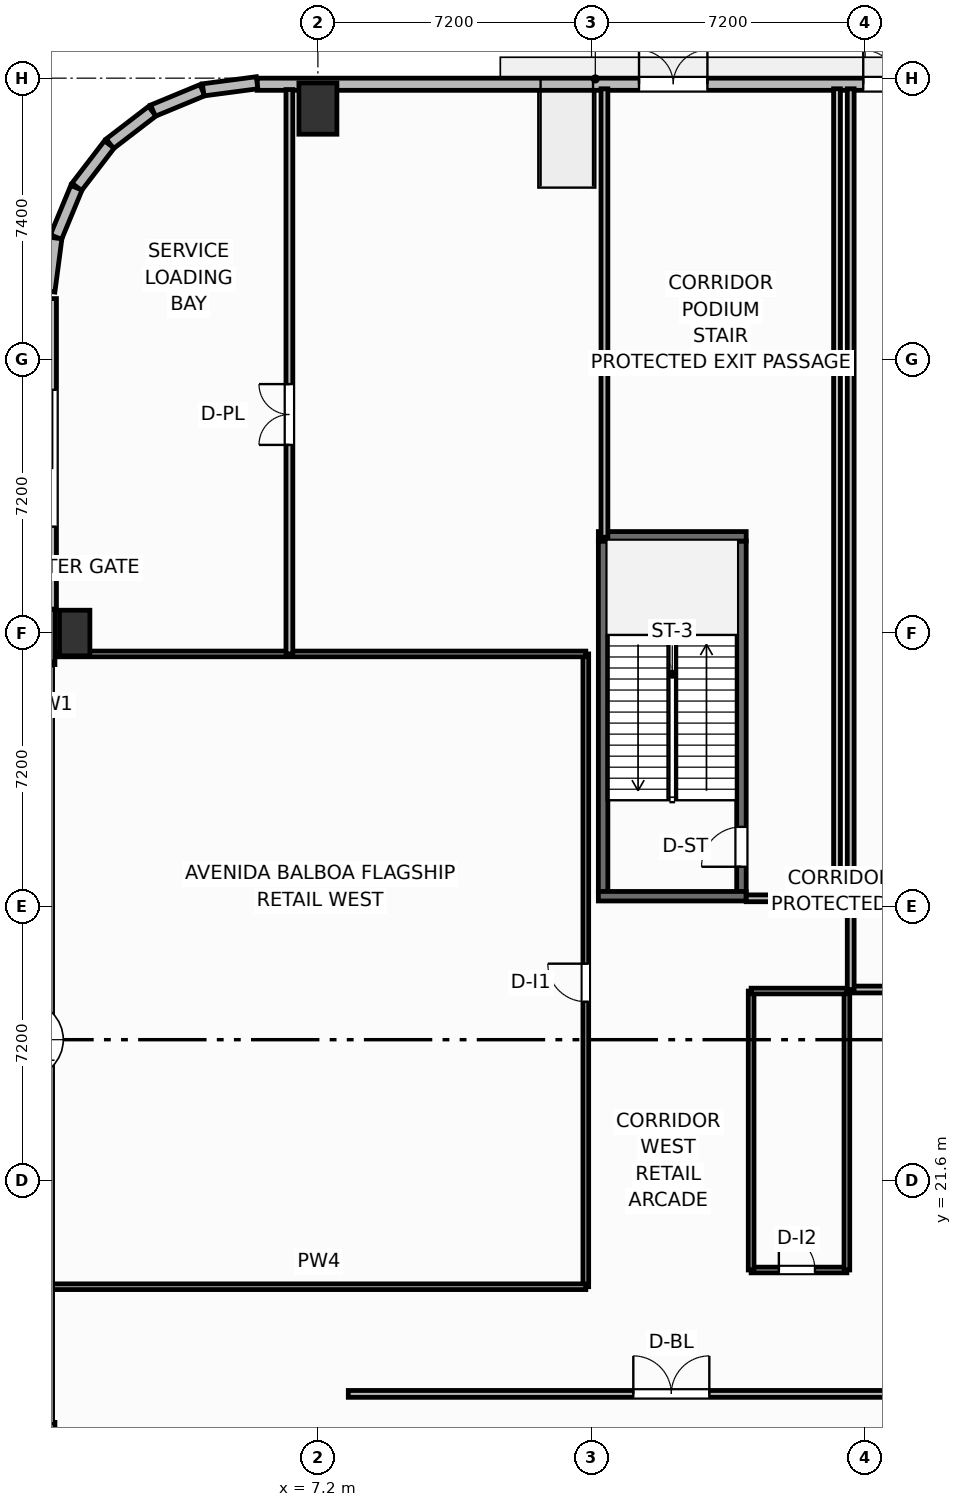
"""IFC4 building model, lengths in metres.
Left out: names, types, materials, properties, quantities, classifications, styles, units other than length and angle.
Written with IfcOpenShell. Run it as: python <this file> out.ifc"""

import sys

from ifc_helpers import new_model, si_unit, direction, frame, frame_2d, origin, origin_2d, place, context, subcontext, project, spatial, rectangle, extrude, element, fill, save


model = new_model("IFC4")
c1 = context("Model", 3, precision=1e-05, world=origin(), true_north=direction((0.0, 1.0)))
c2 = subcontext(c1, "Body", "Model", "MODEL_VIEW")
j1 = project(units=[si_unit("LENGTHUNIT", "METRE"), si_unit("PLANEANGLEUNIT", "RADIAN")], contexts=[c1])
p1 = place(None, origin())
s1 = spatial("IfcSite", under=j1, at=p1, CompositionType="ELEMENT")
p2 = place(p1, origin())
s2 = spatial("IfcBuilding", under=s1, at=p2, CompositionType="ELEMENT")
p3 = place(p2, origin())
s3 = spatial("IfcBuildingStorey", under=s2, at=p3, CompositionType="ELEMENT", Elevation=0.0)
p4 = place(p3, frame((14.705, 29.2, 0.0), z_axis=(0.0, 0.0, 1.0), x_axis=(0.0, 1.0, 0.0)))
e1 = element("IfcWall", 1, at=p4, inside=s3, PredefinedType="SHEAR", context=c2, shape_type="SweptSolid", body=[
    extrude(rectangle(XDim=9.22, YDim=0.25, at=frame_2d((4.61, 0.0))), origin(), (0.0, 0.0, 1.0), 5.12),
])
p5 = place(p3, frame((18.345, 29.2, 0.0), z_axis=(0.0, 0.0, 1.0), x_axis=(0.0, 1.0, 0.0)))
e2 = element("IfcWall", 2, at=p5, inside=s3, PredefinedType="SHEAR", context=c2, shape_type="SweptSolid", body=[
    extrude(rectangle(XDim=9.22, YDim=0.25, at=frame_2d((4.61, 0.0))), origin(), (0.0, 0.0, 1.0), 5.12),
])
p6 = place(p5, frame((0.65, 0.0, 0.0)))
e3 = element("IfcOpeningElement", 3, at=p6, cuts=e2, PredefinedType="OPENING", context=c2, shape_type="SweptSolid", body=[
    extrude(rectangle(XDim=1.05, YDim=2.15, at=frame_2d((0.525, 1.075))), frame((0.0, 0.135, 0.0), z_axis=(0.0, -1.0, 0.0), x_axis=(1.0, 0.0, 0.0)), (0.0, 0.0, 1.0), 0.27),
])
for number, where, z_axis, x_axis in (
    (4, (14.58, 38.545, 0.0), (0.0, 0.0, 1.0), (1.0, 0.0, 0.0)),
    (5, (14.58, 29.075, 0.0), (0.0, 0.0, 1.0), (1.0, 0.0, 0.0)),
):
    element("IfcWall", number, at=place(p3, frame(where, z_axis=z_axis, x_axis=x_axis)), inside=s3, PredefinedType="SHEAR", context=c2, shape_type="SweptSolid", body=[
        extrude(rectangle(XDim=3.89, YDim=0.25, at=frame_2d((1.945, 0.0))), origin(), (0.0, 0.0, 1.0), 5.12),
    ])
p7 = place(p3, frame((7.2, 49.8, 0.0), z_axis=(0.0, 0.0, 1.0), x_axis=(1.0, 0.0, 0.0)))
e6 = element("IfcColumn", 6, at=p7, inside=s3, PredefinedType="COLUMN", context=c2, shape_type="SweptSolid", body=[
    extrude(rectangle(XDim=1.0, YDim=1.35, at=origin_2d()), origin(), (0.0, 0.0, 1.0), 5.4),
])
p8 = place(p3, frame((0.8, 36.0, 0.0), z_axis=(0.0, 0.0, 1.0), x_axis=(1.0, 0.0, 0.0)))
e7 = element("IfcColumn", 7, at=p8, inside=s3, PredefinedType="PILASTER", context=c2, shape_type="SweptSolid", body=[
    extrude(rectangle(XDim=0.8, YDim=1.2, at=origin_2d()), origin(), (0.0, 0.0, 1.0), 5.4),
])
p9 = place(p3, frame((5.6, 50.44, 0.0), z_axis=(0.0, 0.0, 1.0), x_axis=(1.0, 0.0, 0.0)))
e8 = element("IfcWall", 8, at=p9, inside=s3, PredefinedType="SOLIDWALL", context=c2, shape_type="SweptSolid", body=[
    extrude(rectangle(XDim=67.2, YDim=0.32, at=frame_2d((33.6, 0.0))), origin(), (0.0, 0.0, 1.0), 4.07),
])
p10 = place(p9, frame((10.05, 0.0, 0.0)))
e9 = element("IfcOpeningElement", 9, at=p10, cuts=e8, PredefinedType="OPENING", context=c2, shape_type="SweptSolid", body=[
    extrude(rectangle(XDim=1.8, YDim=2.2, at=frame_2d((0.9, 1.1))), frame((0.0, 0.17, 0.0), z_axis=(0.0, -1.0, 0.0), x_axis=(1.0, 0.0, 0.0)), (0.0, 0.0, 1.0), 0.34),
])
p11 = place(p9, frame((15.95, 0.0, 0.0)))
e10 = element("IfcOpeningElement", 10, at=p11, cuts=e8, PredefinedType="OPENING", context=c2, shape_type="SweptSolid", body=[
    extrude(rectangle(XDim=1.8, YDim=2.2, at=frame_2d((0.9, 1.1))), frame((0.0, 0.17, 0.0), z_axis=(0.0, -1.0, 0.0), x_axis=(1.0, 0.0, 0.0)), (0.0, 0.0, 1.0), 0.34),
])
p12 = place(p9, frame((43.45, 0.0, 0.0)))
e11 = element("IfcOpeningElement", 11, at=p12, cuts=e8, PredefinedType="OPENING", context=c2, shape_type="SweptSolid", body=[
    extrude(rectangle(XDim=1.8, YDim=2.2, at=frame_2d((0.9, 1.1))), frame((0.0, 0.17, 0.0), z_axis=(0.0, -1.0, 0.0), x_axis=(1.0, 0.0, 0.0)), (0.0, 0.0, 1.0), 0.34),
])
p13 = place(p9, frame((50.5, 0.0, 0.0)))
e12 = element("IfcOpeningElement", 12, at=p13, cuts=e8, PredefinedType="OPENING", context=c2, shape_type="SweptSolid", body=[
    extrude(rectangle(XDim=1.8, YDim=2.2, at=frame_2d((0.9, 1.1))), frame((0.0, 0.17, 0.0), z_axis=(0.0, -1.0, 0.0), x_axis=(1.0, 0.0, 0.0)), (0.0, 0.0, 1.0), 0.34),
])
p14 = place(p9, frame((57.8, 0.0, 0.0)))
e13 = element("IfcOpeningElement", 13, at=p14, cuts=e8, PredefinedType="OPENING", context=c2, shape_type="SweptSolid", body=[
    extrude(rectangle(XDim=6.0, YDim=3.2, at=frame_2d((3.0, 1.6))), frame((0.0, 0.17, 0.0), z_axis=(0.0, -1.0, 0.0), x_axis=(1.0, 0.0, 0.0)), (0.0, 0.0, 1.0), 0.34),
])
p15 = place(p3, frame((0.16, 36.6, 0.0), z_axis=(0.0, 0.0, 1.0), x_axis=(0.0, 1.0, 0.0)))
e14 = element("IfcWall", 14, at=p15, inside=s3, PredefinedType="SOLIDWALL", context=c2, shape_type="SweptSolid", body=[
    extrude(rectangle(XDim=8.2, YDim=0.32, at=frame_2d((4.1, 0.0))), origin(), (0.0, 0.0, 1.0), 4.07),
])
p16 = place(p15, frame((2.2, 0.0, 0.0)))
e15 = element("IfcOpeningElement", 15, at=p16, cuts=e14, PredefinedType="OPENING", context=c2, shape_type="SweptSolid", body=[
    extrude(rectangle(XDim=3.6, YDim=3.2, at=frame_2d((1.8, 1.6))), frame((0.0, 0.17, 0.0), z_axis=(0.0, -1.0, 0.0), x_axis=(1.0, 0.0, 0.0)), (0.0, 0.0, 1.0), 0.34),
])
p17 = place(p3, frame((5.6, 50.479, 0.0), z_axis=(0.0, 0.0, 1.0), x_axis=(-0.991439766505, -0.130564885759, 0.0)))
e16 = element("IfcWall", 16, at=p17, inside=s3, PredefinedType="SOLIDWALL", context=c2, shape_type="SweptSolid", body=[
    extrude(rectangle(XDim=1.43, YDim=0.32, at=frame_2d((0.715, 0.0))), origin(), (0.0, 0.0, 1.0), 4.07),
])
p18 = place(p3, frame((4.159, 50.283, 0.0), z_axis=(0.0, 0.0, 1.0), x_axis=(-0.923841042178, -0.382776343035, 0.0)))
e17 = element("IfcWall", 17, at=p18, inside=s3, PredefinedType="SOLIDWALL", context=c2, shape_type="SweptSolid", body=[
    extrude(rectangle(XDim=1.405, YDim=0.32, at=frame_2d((0.703, 0.0))), origin(), (0.0, 0.0, 1.0), 4.07),
])
p19 = place(p3, frame((2.841, 49.73, 0.0), z_axis=(0.0, 0.0, 1.0), x_axis=(-0.79338541907, -0.60871962085, 0.0)))
e18 = element("IfcWall", 18, at=p19, inside=s3, PredefinedType="SOLIDWALL", context=c2, shape_type="SweptSolid", body=[
    extrude(rectangle(XDim=1.405, YDim=0.32, at=frame_2d((0.703, 0.0))), origin(), (0.0, 0.0, 1.0), 4.07),
])
p20 = place(p3, frame((1.711, 48.854, 0.0), z_axis=(0.0, 0.0, 1.0), x_axis=(-0.608828954222, -0.793301521807, 0.0)))
e19 = element("IfcWall", 19, at=p20, inside=s3, PredefinedType="SOLIDWALL", context=c2, shape_type="SweptSolid", body=[
    extrude(rectangle(XDim=1.406, YDim=0.32, at=frame_2d((0.703, 0.0))), origin(), (0.0, 0.0, 1.0), 4.07),
])
p21 = place(p3, frame((0.846, 47.716, 0.0), z_axis=(0.0, 0.0, 1.0), x_axis=(-0.382924622758, -0.923779591291, 0.0)))
e20 = element("IfcWall", 20, at=p21, inside=s3, PredefinedType="SOLIDWALL", context=c2, shape_type="SweptSolid", body=[
    extrude(rectangle(XDim=1.405, YDim=0.32, at=frame_2d((0.703, 0.0))), origin(), (0.0, 0.0, 1.0), 4.07),
])
p22 = place(p3, frame((0.304, 46.393, 0.0), z_axis=(0.0, 0.0, 1.0), x_axis=(-0.130432168094, -0.991457235349, 0.0)))
e21 = element("IfcWall", 21, at=p22, inside=s3, PredefinedType="SOLIDWALL", context=c2, shape_type="SweptSolid", body=[
    extrude(rectangle(XDim=1.413, YDim=0.32, at=frame_2d((0.707, 0.0))), origin(), (0.0, 0.0, 1.0), 4.07),
])
p23 = place(p3, frame((0.12, 36.63, 0.0), z_axis=(0.0, 0.0, 1.0), x_axis=(0.0, -1.0, 0.0)))
e22 = element("IfcWall", 22, at=p23, inside=s3, PredefinedType="SOLIDWALL", context=c2, shape_type="SweptSolid", body=[
    extrude(rectangle(XDim=1.46, YDim=0.32, at=frame_2d((0.73, 0.0))), origin(), (0.0, 0.0, 1.0), 4.07),
])
p24 = place(p3, frame((0.12, 15.23, 0.0), z_axis=(0.0, 0.0, 1.0), x_axis=(0.0, -1.0, 0.0)))
e23 = element("IfcWall", 23, at=p24, inside=s3, PredefinedType="SOLIDWALL", context=c2, shape_type="SweptSolid", body=[
    extrude(rectangle(XDim=9.597, YDim=0.32, at=frame_2d((4.799, 0.0))), origin(), (0.0, 0.0, 1.0), 4.07),
])
p25 = place(p3, frame((8.0, 15.98, 0.0), z_axis=(0.0, 0.0, 1.0), x_axis=(1.0, 0.0, 0.0)))
e24 = element("IfcWall", 24, at=p25, inside=s3, PredefinedType="PARTITIONING", context=c2, shape_type="SweptSolid", body=[
    extrude(rectangle(XDim=15.7, YDim=0.18, at=frame_2d((7.85, 0.0))), origin(), (0.0, 0.0, 1.0), 4.085),
])
p26 = place(p25, frame((7.5, 0.0, 0.0)))
e25 = element("IfcOpeningElement", 25, at=p26, cuts=e24, PredefinedType="OPENING", context=c2, shape_type="SweptSolid", body=[
    extrude(rectangle(XDim=2.0, YDim=2.05, at=frame_2d((1.0, 1.025))), frame((0.0, 0.1, 0.0), z_axis=(0.0, -1.0, 0.0), x_axis=(1.0, 0.0, 0.0)), (0.0, 0.0, 1.0), 0.2),
])
p27 = place(p3, frame((18.47, 29.02, 0.0), z_axis=(0.0, 0.0, 1.0), x_axis=(1.0, 0.0, 0.0)))
e26 = element("IfcWall", 26, at=p27, inside=s3, PredefinedType="PARTITIONING", context=c2, shape_type="SweptSolid", body=[
    extrude(rectangle(XDim=2.39, YDim=0.18, at=frame_2d((1.195, 0.0))), origin(), (0.0, 0.0, 1.0), 5.12),
])
p28 = place(p3, frame((20.86, 29.02, 0.0), z_axis=(0.0, 0.0, 1.0), x_axis=(0.0, 1.0, 0.0)))
e27 = element("IfcWall", 27, at=p28, inside=s3, PredefinedType="PARTITIONING", context=c2, shape_type="SweptSolid", body=[
    extrude(rectangle(XDim=21.3, YDim=0.18, at=frame_2d((10.65, 0.0))), origin(), (0.0, 0.0, 1.0), 5.12),
])
p29 = place(p3, frame((14.74, 38.52, 0.0), z_axis=(0.0, 0.0, 1.0), x_axis=(0.0, 1.0, 0.0)))
e28 = element("IfcWall", 28, at=p29, inside=s3, PredefinedType="PARTITIONING", context=c2, shape_type="SweptSolid", body=[
    extrude(rectangle(XDim=11.8, YDim=0.18, at=frame_2d((5.9, 0.0))), origin(), (0.0, 0.0, 1.0), 5.12),
])
p30 = place(p3, frame((21.22, 26.62, 0.0), z_axis=(0.0, 0.0, 1.0), x_axis=(1.0, 0.0, 0.0)))
e29 = element("IfcWall", 29, at=p30, inside=s3, PredefinedType="PARTITIONING", context=c2, shape_type="SweptSolid", body=[
    extrude(rectangle(XDim=13.5, YDim=0.18, at=frame_2d((6.75, 0.0))), origin(), (0.0, 0.0, 1.0), 4.332),
])
p31 = place(p30, frame((5.2, 0.0, 0.0)))
e30 = element("IfcOpeningElement", 30, at=p31, cuts=e29, PredefinedType="OPENING", context=c2, shape_type="SweptSolid", body=[
    extrude(rectangle(XDim=1.1, YDim=2.15, at=frame_2d((0.55, 1.075))), frame((0.0, 0.1, 0.0), z_axis=(0.0, -1.0, 0.0), x_axis=(1.0, 0.0, 0.0)), (0.0, 0.0, 1.0), 0.2),
])
p32 = place(p3, frame((21.22, 26.62, 0.0), z_axis=(0.0, 0.0, 1.0), x_axis=(0.0, 1.0, 0.0)))
e31 = element("IfcWall", 31, at=p32, inside=s3, PredefinedType="PARTITIONING", context=c2, shape_type="SweptSolid", body=[
    extrude(rectangle(XDim=23.7, YDim=0.18, at=frame_2d((11.85, 0.0))), origin(), (0.0, 0.0, 1.0), 5.12),
])
p33 = place(p3, frame((14.25, 18.8, 0.0), z_axis=(0.0, 0.0, 1.0), x_axis=(0.0, 1.0, 0.0)))
e32 = element("IfcWall", 32, at=p33, inside=s3, PredefinedType="PARTITIONING", context=c2, shape_type="SweptSolid", body=[
    extrude(rectangle(XDim=16.65, YDim=0.15, at=frame_2d((8.325, 0.0))), origin(), (0.0, 0.0, 1.0), 5.12),
])
p34 = place(p33, frame((7.5, 0.0, 0.0)))
e33 = element("IfcOpeningElement", 33, at=p34, cuts=e32, PredefinedType="OPENING", context=c2, shape_type="SweptSolid", body=[
    extrude(rectangle(XDim=1.0, YDim=2.05, at=frame_2d((0.5, 1.025))), frame((0.0, 0.085, 0.0), z_axis=(0.0, -1.0, 0.0), x_axis=(1.0, 0.0, 0.0)), (0.0, 0.0, 1.0), 0.17),
])
p35 = place(p3, frame((0.2, 18.8, 0.0), z_axis=(0.0, 0.0, 1.0), x_axis=(1.0, 0.0, 0.0)))
e34 = element("IfcWall", 34, at=p35, inside=s3, PredefinedType="PARTITIONING", context=c2, shape_type="SweptSolid", body=[
    extrude(rectangle(XDim=14.05, YDim=0.15, at=frame_2d((7.025, 0.0))), origin(), (0.0, 0.0, 1.0), 5.12),
])
p36 = place(p3, frame((0.3, 35.45, 0.0), z_axis=(0.0, 0.0, 1.0), x_axis=(1.0, 0.0, 0.0)))
e35 = element("IfcWall", 35, at=p36, inside=s3, PredefinedType="PARTITIONING", context=c2, shape_type="SweptSolid", body=[
    extrude(rectangle(XDim=13.95, YDim=0.15, at=frame_2d((6.975, 0.0))), origin(), (0.0, 0.0, 1.0), 5.12),
])
p37 = place(p3, frame((18.6, 19.24, 0.0), z_axis=(0.0, 0.0, 1.0), x_axis=(1.0, 0.0, 0.0)))
e36 = element("IfcWall", 36, at=p37, inside=s3, PredefinedType="PARTITIONING", context=c2, shape_type="SweptSolid", body=[
    extrude(rectangle(XDim=2.52, YDim=0.15, at=frame_2d((1.26, 0.0))), origin(), (0.0, 0.0, 1.0), 5.12),
])
p38 = place(p37, frame((0.73, 0.0, 0.0)))
e37 = element("IfcOpeningElement", 37, at=p38, cuts=e36, PredefinedType="OPENING", context=c2, shape_type="SweptSolid", body=[
    extrude(rectangle(XDim=0.95, YDim=2.05, at=frame_2d((0.475, 1.025))), frame((0.0, 0.085, 0.0), z_axis=(0.0, -1.0, 0.0), x_axis=(1.0, 0.0, 0.0)), (0.0, 0.0, 1.0), 0.17),
])
for number, where, z_axis, x_axis in (
    (38, (21.12, 19.24, 0.0), (0.0, 0.0, 1.0), (0.0, 1.0, 0.0)),
    (39, (18.6, 19.24, 0.0), (0.0, 0.0, 1.0), (0.0, 1.0, 0.0)),
):
    element("IfcWall", number, at=place(p3, frame(where, z_axis=z_axis, x_axis=x_axis)), inside=s3, PredefinedType="PARTITIONING", context=c2, shape_type="SweptSolid", body=[
        extrude(rectangle(XDim=7.34, YDim=0.15, at=frame_2d((3.67, 0.0))), origin(), (0.0, 0.0, 1.0), 5.12),
    ])
p39 = place(p3, frame((18.6, 26.58, 0.0), z_axis=(0.0, 0.0, 1.0), x_axis=(1.0, 0.0, 0.0)))
e40 = element("IfcWall", 40, at=p39, inside=s3, PredefinedType="PARTITIONING", context=c2, shape_type="SweptSolid", body=[
    extrude(rectangle(XDim=2.52, YDim=0.15, at=frame_2d((1.26, 0.0))), origin(), (0.0, 0.0, 1.0), 5.12),
])
p40 = place(p3, frame((6.45, 35.45, 0.0), z_axis=(0.0, 0.0, 1.0), x_axis=(0.0, 1.0, 0.0)))
e41 = element("IfcWall", 41, at=p40, inside=s3, PredefinedType="PARTITIONING", context=c2, shape_type="SweptSolid", body=[
    extrude(rectangle(XDim=14.85, YDim=0.18, at=frame_2d((7.425, 0.0))), origin(), (0.0, 0.0, 1.0), 5.12),
])
p41 = place(p40, frame((5.5, 0.0, 0.0)))
e42 = element("IfcOpeningElement", 42, at=p41, cuts=e41, PredefinedType="OPENING", context=c2, shape_type="SweptSolid", body=[
    extrude(rectangle(XDim=1.6, YDim=2.05, at=frame_2d((0.8, 1.025))), frame((0.0, 0.1, 0.0), z_axis=(0.0, -1.0, 0.0), x_axis=(1.0, 0.0, 0.0)), (0.0, 0.0, 1.0), 0.2),
])
p42 = place(p10, origin())
e43 = element("IfcDoor", 43, at=p42, inside=s3, OperationType="DOUBLE_DOOR_SINGLE_SWING", PredefinedType="DOOR", context=c2, shape_type="SweptSolid", body=[
    extrude(rectangle(XDim=1.8, YDim=2.2, at=frame_2d((0.9, 1.1))), frame((0.0, 0.025, 0.0), z_axis=(0.0, -1.0, 0.0), x_axis=(1.0, 0.0, 0.0)), (0.0, 0.0, 1.0), 0.05),
])
fill(e9, e43)
p43 = place(p11, origin())
e44 = element("IfcDoor", 44, at=p43, inside=s3, OperationType="DOUBLE_DOOR_SINGLE_SWING", PredefinedType="DOOR", context=c2, shape_type="SweptSolid", body=[
    extrude(rectangle(XDim=1.8, YDim=2.2, at=frame_2d((0.9, 1.1))), frame((0.0, 0.025, 0.0), z_axis=(0.0, -1.0, 0.0), x_axis=(1.0, 0.0, 0.0)), (0.0, 0.0, 1.0), 0.05),
])
fill(e10, e44)
p44 = place(p26, origin())
e45 = element("IfcDoor", 45, at=p44, inside=s3, OperationType="DOUBLE_DOOR_SINGLE_SWING", PredefinedType="DOOR", context=c2, shape_type="SweptSolid", body=[
    extrude(rectangle(XDim=2.0, YDim=2.05, at=frame_2d((1.0, 1.025))), frame((0.0, 0.025, 0.0), z_axis=(0.0, -1.0, 0.0), x_axis=(1.0, 0.0, 0.0)), (0.0, 0.0, 1.0), 0.05),
])
fill(e25, e45)
p45 = place(p34, origin())
e46 = element("IfcDoor", 46, at=p45, inside=s3, OperationType="SINGLE_SWING_RIGHT", PredefinedType="DOOR", context=c2, shape_type="SweptSolid", body=[
    extrude(rectangle(XDim=1.0, YDim=2.05, at=frame_2d((0.5, 1.025))), frame((0.0, 0.025, 0.0), z_axis=(0.0, -1.0, 0.0), x_axis=(1.0, 0.0, 0.0)), (0.0, 0.0, 1.0), 0.05),
])
fill(e33, e46)
p46 = place(p38, origin())
e47 = element("IfcDoor", 47, at=p46, inside=s3, OperationType="SINGLE_SWING_LEFT", PredefinedType="DOOR", context=c2, shape_type="SweptSolid", body=[
    extrude(rectangle(XDim=0.95, YDim=2.05, at=frame_2d((0.475, 1.025))), frame((0.0, 0.025, 0.0), z_axis=(0.0, -1.0, 0.0), x_axis=(1.0, 0.0, 0.0)), (0.0, 0.0, 1.0), 0.05),
])
fill(e37, e47)
p47 = place(p41, origin())
e48 = element("IfcDoor", 48, at=p47, inside=s3, OperationType="DOUBLE_DOOR_SINGLE_SWING", PredefinedType="DOOR", context=c2, shape_type="SweptSolid", body=[
    extrude(rectangle(XDim=1.6, YDim=2.05, at=frame_2d((0.8, 1.025))), frame((0.0, 0.025, 0.0), z_axis=(0.0, -1.0, 0.0), x_axis=(1.0, 0.0, 0.0)), (0.0, 0.0, 1.0), 0.05),
])
fill(e42, e48)
p48 = place(p6, origin())
e49 = element("IfcDoor", 49, at=p48, inside=s3, OperationType="SINGLE_SWING_LEFT", PredefinedType="DOOR", context=c2, shape_type="SweptSolid", body=[
    extrude(rectangle(XDim=1.05, YDim=2.15, at=frame_2d((0.525, 1.075))), frame((0.0, 0.025, 0.0), z_axis=(0.0, -1.0, 0.0), x_axis=(1.0, 0.0, 0.0)), (0.0, 0.0, 1.0), 0.05),
])
fill(e3, e49)
save(model, sys.argv[1])
